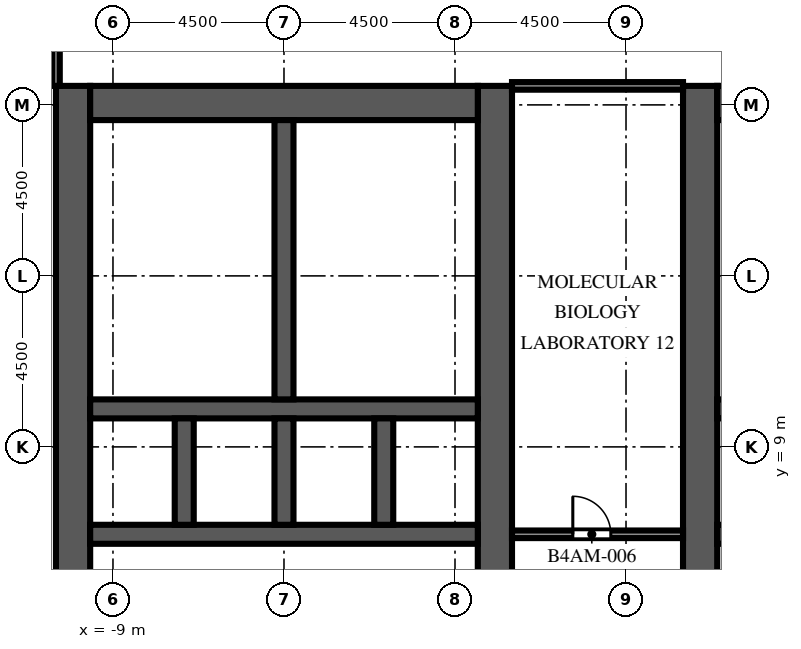
"""IFC4 building model, lengths in metres.
Left out: names, types, materials, properties, quantities, classifications, styles, units other than length and angle.
Written with IfcOpenShell. Run it as: python <this file> out.ifc"""

import sys

from ifc_helpers import new_model, si_unit, direction, frame, frame_2d, origin, place, context, subcontext, project, spatial, rectangle, extrude, element, fill, save


model = new_model("IFC4")
c1 = context("Model", 3, precision=1e-05, world=origin(), true_north=direction((0.0, 1.0)))
c2 = subcontext(c1, "Body", "Model", "MODEL_VIEW")
j1 = project(units=[si_unit("LENGTHUNIT", "METRE"), si_unit("PLANEANGLEUNIT", "RADIAN")], contexts=[c1])
p1 = place(None, origin())
s1 = spatial("IfcSite", under=j1, at=p1, CompositionType="ELEMENT")
p2 = place(p1, origin())
s2 = spatial("IfcBuilding", under=s1, at=p2, CompositionType="ELEMENT")
p3 = place(p2, frame((0.0, 0.0, 145.4)))
s3 = spatial("IfcBuildingStorey", under=s2, at=p3, CompositionType="ELEMENT", Elevation=145.4)
p4 = place(p3, frame((-10.05, -9.0, 0.0), z_axis=(0.0, 0.0, 1.0), x_axis=(0.0, 1.0, 0.0)))
e1 = element("IfcWall", 1, at=p4, inside=s3, PredefinedType="SHEAR", context=c2, shape_type="SweptSolid", body=[
    extrude(rectangle(XDim=27.5, YDim=0.9, at=frame_2d((13.75, 0.0))), origin(), (0.0, 0.0, 1.0), 6.0),
])
p5 = place(p4, frame((12.55, 0.0, 0.0)))
e2 = element("IfcOpeningElement", 2, at=p5, cuts=e1, PredefinedType="OPENING", context=c2, shape_type="SweptSolid", body=[
    extrude(rectangle(XDim=2.4, YDim=2.4, at=frame_2d((1.2, 1.2))), frame((0.0, 0.46, 0.0), z_axis=(0.0, -1.0, 0.0), x_axis=(1.0, 0.0, 0.0)), (0.0, 0.0, 1.0), 0.92),
])
p6 = place(p4, frame((6.825, 0.0, 0.0)))
e3 = element("IfcOpeningElement", 3, at=p6, cuts=e1, PredefinedType="OPENING", context=c2, shape_type="SweptSolid", body=[
    extrude(rectangle(XDim=1.2, YDim=2.1, at=frame_2d((0.6, 1.05))), frame((0.0, 0.46, 0.0), z_axis=(0.0, -1.0, 0.0), x_axis=(1.0, 0.0, 0.0)), (0.0, 0.0, 1.0), 0.92),
])
p7 = place(p4, frame((19.475, 0.0, 0.0)))
e4 = element("IfcOpeningElement", 4, at=p7, cuts=e1, PredefinedType="OPENING", context=c2, shape_type="SweptSolid", body=[
    extrude(rectangle(XDim=1.2, YDim=2.1, at=frame_2d((0.6, 1.05))), frame((0.0, 0.46, 0.0), z_axis=(0.0, -1.0, 0.0), x_axis=(1.0, 0.0, 0.0)), (0.0, 0.0, 1.0), 0.92),
])
p8 = place(p3, frame((1.05, -9.0, 0.0), z_axis=(0.0, 0.0, 1.0), x_axis=(0.0, 1.0, 0.0)))
e5 = element("IfcWall", 5, at=p8, inside=s3, PredefinedType="SHEAR", context=c2, shape_type="SweptSolid", body=[
    extrude(rectangle(XDim=27.5, YDim=0.9, at=frame_2d((13.75, 0.0))), origin(), (0.0, 0.0, 1.0), 6.0),
])
p9 = place(p8, frame((12.55, 0.0, 0.0)))
e6 = element("IfcOpeningElement", 6, at=p9, cuts=e5, PredefinedType="OPENING", context=c2, shape_type="SweptSolid", body=[
    extrude(rectangle(XDim=2.4, YDim=2.4, at=frame_2d((1.2, 1.2))), frame((0.0, 0.46, 0.0), z_axis=(0.0, -1.0, 0.0), x_axis=(1.0, 0.0, 0.0)), (0.0, 0.0, 1.0), 0.92),
])
p10 = place(p8, frame((5.51, 0.0, 0.0)))
e7 = element("IfcOpeningElement", 7, at=p10, cuts=e5, PredefinedType="OPENING", context=c2, shape_type="SweptSolid", body=[
    extrude(rectangle(XDim=0.923, YDim=2.1, at=frame_2d((0.461, 1.05))), frame((0.0, 0.46, 0.0), z_axis=(0.0, -1.0, 0.0), x_axis=(1.0, 0.0, 0.0)), (0.0, 0.0, 1.0), 0.92),
])
p11 = place(p8, frame((23.427, 0.0, 0.0)))
e8 = element("IfcOpeningElement", 8, at=p11, cuts=e5, PredefinedType="OPENING", context=c2, shape_type="SweptSolid", body=[
    extrude(rectangle(XDim=1.2, YDim=2.1, at=frame_2d((0.6, 1.05))), frame((0.0, 0.46, 0.0), z_axis=(0.0, -1.0, 0.0), x_axis=(1.0, 0.0, 0.0)), (0.0, 0.0, 1.0), 0.92),
])
p12 = place(p3, frame((-9.6, 18.05, 0.0), z_axis=(0.0, 0.0, 1.0), x_axis=(1.0, 0.0, 0.0)))
e9 = element("IfcWall", 9, at=p12, inside=s3, PredefinedType="SHEAR", context=c2, shape_type="SweptSolid", body=[
    extrude(rectangle(XDim=10.2, YDim=0.9, at=frame_2d((5.1, 0.0))), origin(), (0.0, 0.0, 1.0), 6.0),
])
p13 = place(p3, frame((-9.6, 6.7, 0.0), z_axis=(0.0, 0.0, 1.0), x_axis=(1.0, 0.0, 0.0)))
e10 = element("IfcWall", 10, at=p13, inside=s3, PredefinedType="SHEAR", context=c2, shape_type="SweptSolid", body=[
    extrude(rectangle(XDim=10.2, YDim=0.5, at=frame_2d((5.1, 0.0))), origin(), (0.0, 0.0, 1.0), 6.0),
])
p14 = place(p13, frame((0.562, 0.0, 0.0)))
e11 = element("IfcOpeningElement", 11, at=p14, cuts=e10, PredefinedType="OPENING", context=c2, shape_type="SweptSolid", body=[
    extrude(rectangle(XDim=1.1, YDim=2.1, at=frame_2d((0.55, 1.05))), frame((0.0, 0.26, 0.0), z_axis=(0.0, -1.0, 0.0), x_axis=(1.0, 0.0, 0.0)), (0.0, 0.0, 1.0), 0.52),
])
p15 = place(p13, frame((3.288, 0.0, 0.0)))
e12 = element("IfcOpeningElement", 12, at=p15, cuts=e10, PredefinedType="OPENING", context=c2, shape_type="SweptSolid", body=[
    extrude(rectangle(XDim=1.0, YDim=2.1, at=frame_2d((0.5, 1.05))), frame((0.0, 0.26, 0.0), z_axis=(0.0, -1.0, 0.0), x_axis=(1.0, 0.0, 0.0)), (0.0, 0.0, 1.0), 0.52),
])
p16 = place(p13, frame((5.913, 0.0, 0.0)))
e13 = element("IfcOpeningElement", 13, at=p16, cuts=e10, PredefinedType="OPENING", context=c2, shape_type="SweptSolid", body=[
    extrude(rectangle(XDim=1.0, YDim=2.1, at=frame_2d((0.5, 1.05))), frame((0.0, 0.26, 0.0), z_axis=(0.0, -1.0, 0.0), x_axis=(1.0, 0.0, 0.0)), (0.0, 0.0, 1.0), 0.52),
])
p17 = place(p13, frame((8.587, 0.0, 0.0)))
e14 = element("IfcOpeningElement", 14, at=p17, cuts=e10, PredefinedType="OPENING", context=c2, shape_type="SweptSolid", body=[
    extrude(rectangle(XDim=1.0, YDim=2.1, at=frame_2d((0.5, 1.05))), frame((0.0, 0.26, 0.0), z_axis=(0.0, -1.0, 0.0), x_axis=(1.0, 0.0, 0.0)), (0.0, 0.0, 1.0), 0.52),
])
p18 = place(p3, frame((-9.6, 10.0, 0.0), z_axis=(0.0, 0.0, 1.0), x_axis=(1.0, 0.0, 0.0)))
e15 = element("IfcWall", 15, at=p18, inside=s3, PredefinedType="SHEAR", context=c2, shape_type="SweptSolid", body=[
    extrude(rectangle(XDim=10.2, YDim=0.5, at=frame_2d((5.1, 0.0))), origin(), (0.0, 0.0, 1.0), 6.0),
])
for number, where, z_axis, x_axis in (
    (16, (-7.125, 6.95, 0.0), (0.0, 0.0, 1.0), (0.0, 1.0, 0.0)),
    (17, (-4.5, 6.95, 0.0), (0.0, 0.0, 1.0), (0.0, 1.0, 0.0)),
    (18, (-1.875, 6.95, 0.0), (0.0, 0.0, 1.0), (0.0, 1.0, 0.0)),
):
    element("IfcWall", number, at=place(p3, frame(where, z_axis=z_axis, x_axis=x_axis)), inside=s3, PredefinedType="SHEAR", context=c2, shape_type="SweptSolid", body=[
        extrude(rectangle(XDim=2.8, YDim=0.5, at=frame_2d((1.4, 0.0))), origin(), (0.0, 0.0, 1.0), 6.0),
    ])
p19 = place(p3, frame((-4.5, 10.25, 0.0), z_axis=(0.0, 0.0, 1.0), x_axis=(0.0, 1.0, 0.0)))
e19 = element("IfcWall", 19, at=p19, inside=s3, PredefinedType="SHEAR", context=c2, shape_type="SweptSolid", body=[
    extrude(rectangle(XDim=7.35, YDim=0.5, at=frame_2d((3.675, 0.0))), origin(), (0.0, 0.0, 1.0), 6.0),
])
p20 = place(p3, frame((6.45, -9.0, 0.0), z_axis=(0.0, 0.0, 1.0), x_axis=(0.0, 1.0, 0.0)))
e20 = element("IfcWall", 20, at=p20, inside=s3, PredefinedType="SHEAR", context=c2, shape_type="SweptSolid", body=[
    extrude(rectangle(XDim=27.5, YDim=0.9, at=frame_2d((13.75, 0.0))), origin(), (0.0, 0.0, 1.0), 6.0),
])
p21 = place(p20, frame((12.55, 0.0, 0.0)))
e21 = element("IfcOpeningElement", 21, at=p21, cuts=e20, PredefinedType="OPENING", context=c2, shape_type="SweptSolid", body=[
    extrude(rectangle(XDim=2.4, YDim=2.4, at=frame_2d((1.2, 1.2))), frame((0.0, 0.46, 0.0), z_axis=(0.0, -1.0, 0.0), x_axis=(1.0, 0.0, 0.0)), (0.0, 0.0, 1.0), 0.92),
])
p22 = place(p20, frame((5.51, 0.0, 0.0)))
e22 = element("IfcOpeningElement", 22, at=p22, cuts=e20, PredefinedType="OPENING", context=c2, shape_type="SweptSolid", body=[
    extrude(rectangle(XDim=0.923, YDim=2.1, at=frame_2d((0.461, 1.05))), frame((0.0, 0.46, 0.0), z_axis=(0.0, -1.0, 0.0), x_axis=(1.0, 0.0, 0.0)), (0.0, 0.0, 1.0), 0.92),
])
p23 = place(p20, frame((23.427, 0.0, 0.0)))
e23 = element("IfcOpeningElement", 23, at=p23, cuts=e20, PredefinedType="OPENING", context=c2, shape_type="SweptSolid", body=[
    extrude(rectangle(XDim=1.2, YDim=2.1, at=frame_2d((0.6, 1.05))), frame((0.0, 0.46, 0.0), z_axis=(0.0, -1.0, 0.0), x_axis=(1.0, 0.0, 0.0)), (0.0, 0.0, 1.0), 0.92),
])
p24 = place(p3, frame((6.9, 18.05, 0.0), z_axis=(0.0, 0.0, 1.0), x_axis=(1.0, 0.0, 0.0)))
e24 = element("IfcWall", 24, at=p24, inside=s3, PredefinedType="SHEAR", context=c2, shape_type="SweptSolid", body=[
    extrude(rectangle(XDim=10.2, YDim=0.9, at=frame_2d((5.1, 0.0))), origin(), (0.0, 0.0, 1.0), 6.0),
])
p25 = place(p3, frame((6.9, 6.7, 0.0), z_axis=(0.0, 0.0, 1.0), x_axis=(1.0, 0.0, 0.0)))
e25 = element("IfcWall", 25, at=p25, inside=s3, PredefinedType="SHEAR", context=c2, shape_type="SweptSolid", body=[
    extrude(rectangle(XDim=10.2, YDim=0.5, at=frame_2d((5.1, 0.0))), origin(), (0.0, 0.0, 1.0), 6.0),
])
p26 = place(p25, frame((0.562, 0.0, 0.0)))
e26 = element("IfcOpeningElement", 26, at=p26, cuts=e25, PredefinedType="OPENING", context=c2, shape_type="SweptSolid", body=[
    extrude(rectangle(XDim=1.1, YDim=2.1, at=frame_2d((0.55, 1.05))), frame((0.0, 0.26, 0.0), z_axis=(0.0, -1.0, 0.0), x_axis=(1.0, 0.0, 0.0)), (0.0, 0.0, 1.0), 0.52),
])
p27 = place(p25, frame((3.288, 0.0, 0.0)))
e27 = element("IfcOpeningElement", 27, at=p27, cuts=e25, PredefinedType="OPENING", context=c2, shape_type="SweptSolid", body=[
    extrude(rectangle(XDim=1.0, YDim=2.1, at=frame_2d((0.5, 1.05))), frame((0.0, 0.26, 0.0), z_axis=(0.0, -1.0, 0.0), x_axis=(1.0, 0.0, 0.0)), (0.0, 0.0, 1.0), 0.52),
])
p28 = place(p25, frame((5.913, 0.0, 0.0)))
e28 = element("IfcOpeningElement", 28, at=p28, cuts=e25, PredefinedType="OPENING", context=c2, shape_type="SweptSolid", body=[
    extrude(rectangle(XDim=1.0, YDim=2.1, at=frame_2d((0.5, 1.05))), frame((0.0, 0.26, 0.0), z_axis=(0.0, -1.0, 0.0), x_axis=(1.0, 0.0, 0.0)), (0.0, 0.0, 1.0), 0.52),
])
p29 = place(p25, frame((8.587, 0.0, 0.0)))
e29 = element("IfcOpeningElement", 29, at=p29, cuts=e25, PredefinedType="OPENING", context=c2, shape_type="SweptSolid", body=[
    extrude(rectangle(XDim=1.0, YDim=2.1, at=frame_2d((0.5, 1.05))), frame((0.0, 0.26, 0.0), z_axis=(0.0, -1.0, 0.0), x_axis=(1.0, 0.0, 0.0)), (0.0, 0.0, 1.0), 0.52),
])
p30 = place(p3, frame((6.9, 10.0, 0.0), z_axis=(0.0, 0.0, 1.0), x_axis=(1.0, 0.0, 0.0)))
e30 = element("IfcWall", 30, at=p30, inside=s3, PredefinedType="SHEAR", context=c2, shape_type="SweptSolid", body=[
    extrude(rectangle(XDim=10.2, YDim=0.5, at=frame_2d((5.1, 0.0))), origin(), (0.0, 0.0, 1.0), 6.0),
])
p31 = place(p3, frame((-0.7, 12.455, 0.0), z_axis=(0.0, 0.0, 1.0), x_axis=(1.0, 0.0, 0.0)))
e31 = element("IfcWall", 31, at=p31, inside=s3, PredefinedType="PARTITIONING", context=c2, shape_type="SweptSolid", body=[
    extrude(rectangle(XDim=1.3, YDim=0.1, at=frame_2d((0.65, 0.0))), origin(), (0.0, 0.0, 1.0), 5.4),
])
p32 = place(p31, frame((0.2, 0.0, 0.0)))
e32 = element("IfcOpeningElement", 32, at=p32, cuts=e31, PredefinedType="OPENING", context=c2, shape_type="SweptSolid", body=[
    extrude(rectangle(XDim=0.9, YDim=2.1, at=frame_2d((0.45, 1.05))), frame((0.0, 0.06, 0.0), z_axis=(0.0, -1.0, 0.0), x_axis=(1.0, 0.0, 0.0)), (0.0, 0.0, 1.0), 0.12),
])
p33 = place(p3, frame((-4.25, 12.455, 0.0), z_axis=(0.0, 0.0, 1.0), x_axis=(1.0, 0.0, 0.0)))
e33 = element("IfcWall", 33, at=p33, inside=s3, PredefinedType="PARTITIONING", context=c2, shape_type="SweptSolid", body=[
    extrude(rectangle(XDim=3.55, YDim=0.1, at=frame_2d((1.775, 0.0))), origin(), (0.0, 0.0, 1.0), 5.4),
])
p34 = place(p3, frame((-0.7, 12.455, 0.0), z_axis=(0.0, 0.0, 1.0), x_axis=(0.0, 1.0, 0.0)))
e34 = element("IfcWall", 34, at=p34, inside=s3, PredefinedType="PARTITIONING", context=c2, shape_type="SweptSolid", body=[
    extrude(rectangle(XDim=2.573, YDim=0.1, at=frame_2d((1.286, 0.0))), origin(), (0.0, 0.0, 1.0), 5.4),
])
p35 = place(p34, frame((0.786, 0.0, 0.0)))
e35 = element("IfcOpeningElement", 35, at=p35, cuts=e34, PredefinedType="OPENING", context=c2, shape_type="SweptSolid", body=[
    extrude(rectangle(XDim=1.0, YDim=2.1, at=frame_2d((0.5, 1.05))), frame((0.0, 0.06, 0.0), z_axis=(0.0, -1.0, 0.0), x_axis=(1.0, 0.0, 0.0)), (0.0, 0.0, 1.0), 0.12),
])
p36 = place(p3, frame((-0.7, 15.028, 0.0), z_axis=(0.0, 0.0, 1.0), x_axis=(0.0, 1.0, 0.0)))
e36 = element("IfcWall", 36, at=p36, inside=s3, PredefinedType="PARTITIONING", context=c2, shape_type="SweptSolid", body=[
    extrude(rectangle(XDim=2.573, YDim=0.1, at=frame_2d((1.286, 0.0))), origin(), (0.0, 0.0, 1.0), 5.4),
])
p37 = place(p36, frame((0.786, 0.0, 0.0)))
e37 = element("IfcOpeningElement", 37, at=p37, cuts=e36, PredefinedType="OPENING", context=c2, shape_type="SweptSolid", body=[
    extrude(rectangle(XDim=1.0, YDim=2.1, at=frame_2d((0.5, 1.05))), frame((0.0, 0.06, 0.0), z_axis=(0.0, -1.0, 0.0), x_axis=(1.0, 0.0, 0.0)), (0.0, 0.0, 1.0), 0.12),
])
p38 = place(p3, frame((-4.25, 15.028, 0.0), z_axis=(0.0, 0.0, 1.0), x_axis=(1.0, 0.0, 0.0)))
e38 = element("IfcWall", 38, at=p38, inside=s3, PredefinedType="PARTITIONING", context=c2, shape_type="SweptSolid", body=[
    extrude(rectangle(XDim=3.55, YDim=0.1, at=frame_2d((1.775, 0.0))), origin(), (0.0, 0.0, 1.0), 5.4),
])
p39 = place(p3, frame((6.9, 12.455, 0.0), z_axis=(0.0, 0.0, 1.0), x_axis=(1.0, 0.0, 0.0)))
e39 = element("IfcWall", 39, at=p39, inside=s3, PredefinedType="PARTITIONING", context=c2, shape_type="SweptSolid", body=[
    extrude(rectangle(XDim=1.3, YDim=0.1, at=frame_2d((0.65, 0.0))), origin(), (0.0, 0.0, 1.0), 5.4),
])
p40 = place(p39, frame((0.2, 0.0, 0.0)))
e40 = element("IfcOpeningElement", 40, at=p40, cuts=e39, PredefinedType="OPENING", context=c2, shape_type="SweptSolid", body=[
    extrude(rectangle(XDim=0.9, YDim=2.1, at=frame_2d((0.45, 1.05))), frame((0.0, 0.06, 0.0), z_axis=(0.0, -1.0, 0.0), x_axis=(1.0, 0.0, 0.0)), (0.0, 0.0, 1.0), 0.12),
])
p41 = place(p3, frame((-10.5, 26.55, 0.0), z_axis=(0.0, 0.0, 1.0), x_axis=(0.0, -1.0, 0.0)))
e41 = element("IfcWall", 41, at=p41, inside=s3, PredefinedType="PARTITIONING", context=c2, shape_type="SweptSolid", body=[
    extrude(rectangle(XDim=8.05, YDim=0.2, at=frame_2d((4.025, 0.0))), origin(), (0.0, 0.0, 1.0), 5.4),
])
p42 = place(p41, frame((0.45, 0.0, 0.0)))
e42 = element("IfcOpeningElement", 42, at=p42, cuts=e41, PredefinedType="OPENING", context=c2, shape_type="SweptSolid", body=[
    extrude(rectangle(XDim=1.0, YDim=2.1, at=frame_2d((0.5, 1.05))), frame((0.0, 0.11, 0.0), z_axis=(0.0, -1.0, 0.0), x_axis=(1.0, 0.0, 0.0)), (0.0, 0.0, 1.0), 0.22),
])
p43 = place(p3, frame((1.5, 6.7, 0.0), z_axis=(0.0, 0.0, 1.0), x_axis=(1.0, 0.0, 0.0)))
e43 = element("IfcWall", 43, at=p43, inside=s3, PredefinedType="PARTITIONING", context=c2, shape_type="SweptSolid", body=[
    extrude(rectangle(XDim=4.5, YDim=0.2, at=frame_2d((2.25, 0.0))), origin(), (0.0, 0.0, 1.0), 5.4),
])
p44 = place(p43, frame((1.6, 0.0, 0.0)))
e44 = element("IfcOpeningElement", 44, at=p44, cuts=e43, PredefinedType="OPENING", context=c2, shape_type="SweptSolid", body=[
    extrude(rectangle(XDim=1.0, YDim=2.1, at=frame_2d((0.5, 1.05))), frame((0.0, 0.11, 0.0), z_axis=(0.0, -1.0, 0.0), x_axis=(1.0, 0.0, 0.0)), (0.0, 0.0, 1.0), 0.22),
])
p45 = place(p3, frame((1.5, 18.5, 0.0), z_axis=(0.0, 0.0, 1.0), x_axis=(1.0, 0.0, 0.0)))
e45 = element("IfcWall", 45, at=p45, inside=s3, PredefinedType="PARTITIONING", context=c2, shape_type="SweptSolid", body=[
    extrude(rectangle(XDim=4.5, YDim=0.2, at=frame_2d((2.25, 0.0))), origin(), (0.0, 0.0, 1.0), 5.4),
])
p46 = place(p14, origin())
e46 = element("IfcDoor", 46, at=p46, inside=s3, OperationType="DOUBLE_DOOR_SLIDING", PredefinedType="DOOR", context=c2, shape_type="SweptSolid", body=[
    extrude(rectangle(XDim=1.1, YDim=2.1, at=frame_2d((0.55, 1.05))), frame((0.0, 0.025, 0.0), z_axis=(0.0, -1.0, 0.0), x_axis=(1.0, 0.0, 0.0)), (0.0, 0.0, 1.0), 0.05),
])
fill(e11, e46)
p47 = place(p5, origin())
e47 = element("IfcDoor", 47, at=p47, inside=s3, OperationType="DOUBLE_DOOR_DOUBLE_SWING", PredefinedType="DOOR", context=c2, shape_type="SweptSolid", body=[
    extrude(rectangle(XDim=2.4, YDim=2.4, at=frame_2d((1.2, 1.2))), frame((0.0, 0.025, 0.0), z_axis=(0.0, -1.0, 0.0), x_axis=(1.0, 0.0, 0.0)), (0.0, 0.0, 1.0), 0.05),
])
fill(e2, e47)
p48 = place(p9, origin())
e48 = element("IfcDoor", 48, at=p48, inside=s3, OperationType="DOUBLE_DOOR_DOUBLE_SWING", PredefinedType="DOOR", context=c2, shape_type="SweptSolid", body=[
    extrude(rectangle(XDim=2.4, YDim=2.4, at=frame_2d((1.2, 1.2))), frame((0.0, 0.025, 0.0), z_axis=(0.0, -1.0, 0.0), x_axis=(1.0, 0.0, 0.0)), (0.0, 0.0, 1.0), 0.05),
])
fill(e6, e48)
p49 = place(p21, origin())
e49 = element("IfcDoor", 49, at=p49, inside=s3, OperationType="DOUBLE_DOOR_DOUBLE_SWING", PredefinedType="DOOR", context=c2, shape_type="SweptSolid", body=[
    extrude(rectangle(XDim=2.4, YDim=2.4, at=frame_2d((1.2, 1.2))), frame((0.0, 0.025, 0.0), z_axis=(0.0, -1.0, 0.0), x_axis=(1.0, 0.0, 0.0)), (0.0, 0.0, 1.0), 0.05),
])
fill(e21, e49)
p50 = place(p7, origin())
e50 = element("IfcDoor", 50, at=p50, inside=s3, OperationType="SINGLE_SWING_LEFT", PredefinedType="DOOR", context=c2, shape_type="SweptSolid", body=[
    extrude(rectangle(XDim=1.2, YDim=2.1, at=frame_2d((0.6, 1.05))), frame((0.0, 0.025, 0.0), z_axis=(0.0, -1.0, 0.0), x_axis=(1.0, 0.0, 0.0)), (0.0, 0.0, 1.0), 0.05),
])
fill(e4, e50)
p51 = place(p15, origin())
e51 = element("IfcDoor", 51, at=p51, inside=s3, OperationType="SINGLE_SWING_RIGHT", PredefinedType="DOOR", context=c2, shape_type="SweptSolid", body=[
    extrude(rectangle(XDim=1.0, YDim=2.1, at=frame_2d((0.5, 1.05))), frame((0.0, 0.025, 0.0), z_axis=(0.0, -1.0, 0.0), x_axis=(1.0, 0.0, 0.0)), (0.0, 0.0, 1.0), 0.05),
])
fill(e12, e51)
p52 = place(p16, origin())
e52 = element("IfcDoor", 52, at=p52, inside=s3, OperationType="SINGLE_SWING_LEFT", PredefinedType="DOOR", context=c2, shape_type="SweptSolid", body=[
    extrude(rectangle(XDim=1.0, YDim=2.1, at=frame_2d((0.5, 1.05))), frame((0.0, 0.025, 0.0), z_axis=(0.0, -1.0, 0.0), x_axis=(1.0, 0.0, 0.0)), (0.0, 0.0, 1.0), 0.05),
])
fill(e13, e52)
p53 = place(p17, origin())
e53 = element("IfcDoor", 53, at=p53, inside=s3, OperationType="SINGLE_SWING_RIGHT", PredefinedType="DOOR", context=c2, shape_type="SweptSolid", body=[
    extrude(rectangle(XDim=1.0, YDim=2.1, at=frame_2d((0.5, 1.05))), frame((0.0, 0.025, 0.0), z_axis=(0.0, -1.0, 0.0), x_axis=(1.0, 0.0, 0.0)), (0.0, 0.0, 1.0), 0.05),
])
fill(e14, e53)
p54 = place(p32, origin())
e54 = element("IfcDoor", 54, at=p54, inside=s3, OperationType="SINGLE_SWING_LEFT", PredefinedType="DOOR", context=c2, shape_type="SweptSolid", body=[
    extrude(rectangle(XDim=0.9, YDim=2.1, at=frame_2d((0.45, 1.05))), frame((0.0, 0.025, 0.0), z_axis=(0.0, -1.0, 0.0), x_axis=(1.0, 0.0, 0.0)), (0.0, 0.0, 1.0), 0.05),
])
fill(e32, e54)
p55 = place(p11, origin())
e55 = element("IfcDoor", 55, at=p55, inside=s3, OperationType="SINGLE_SWING_RIGHT", PredefinedType="DOOR", context=c2, shape_type="SweptSolid", body=[
    extrude(rectangle(XDim=1.2, YDim=2.1, at=frame_2d((0.6, 1.05))), frame((0.0, 0.425, 0.0), z_axis=(0.0, -1.0, 0.0), x_axis=(1.0, 0.0, 0.0)), (0.0, 0.0, 1.0), 0.05),
])
fill(e8, e55)
p56 = place(p35, origin())
e56 = element("IfcDoor", 56, at=p56, inside=s3, OperationType="SINGLE_SWING_LEFT", PredefinedType="DOOR", context=c2, shape_type="SweptSolid", body=[
    extrude(rectangle(XDim=1.0, YDim=2.1, at=frame_2d((0.5, 1.05))), frame((0.0, 0.025, 0.0), z_axis=(0.0, -1.0, 0.0), x_axis=(1.0, 0.0, 0.0)), (0.0, 0.0, 1.0), 0.05),
])
fill(e35, e56)
p57 = place(p37, origin())
e57 = element("IfcDoor", 57, at=p57, inside=s3, OperationType="SINGLE_SWING_RIGHT", PredefinedType="DOOR", context=c2, shape_type="SweptSolid", body=[
    extrude(rectangle(XDim=1.0, YDim=2.1, at=frame_2d((0.5, 1.05))), frame((0.0, 0.025, 0.0), z_axis=(0.0, -1.0, 0.0), x_axis=(1.0, 0.0, 0.0)), (0.0, 0.0, 1.0), 0.05),
])
fill(e37, e57)
p58 = place(p23, origin())
e58 = element("IfcDoor", 58, at=p58, inside=s3, OperationType="SINGLE_SWING_LEFT", PredefinedType="DOOR", context=c2, shape_type="SweptSolid", body=[
    extrude(rectangle(XDim=1.2, YDim=2.1, at=frame_2d((0.6, 1.05))), frame((0.0, -0.375, 0.0), z_axis=(0.0, -1.0, 0.0), x_axis=(1.0, 0.0, 0.0)), (0.0, 0.0, 1.0), 0.05),
])
fill(e23, e58)
p59 = place(p44, origin())
e59 = element("IfcDoor", 59, at=p59, inside=s3, OperationType="SINGLE_SWING_LEFT", PredefinedType="DOOR", context=c2, shape_type="SweptSolid", body=[
    extrude(rectangle(XDim=1.0, YDim=2.1, at=frame_2d((0.5, 1.05))), frame((0.0, 0.025, 0.0), z_axis=(0.0, -1.0, 0.0), x_axis=(1.0, 0.0, 0.0)), (0.0, 0.0, 1.0), 0.05),
])
fill(e44, e59)
save(model, sys.argv[1])
